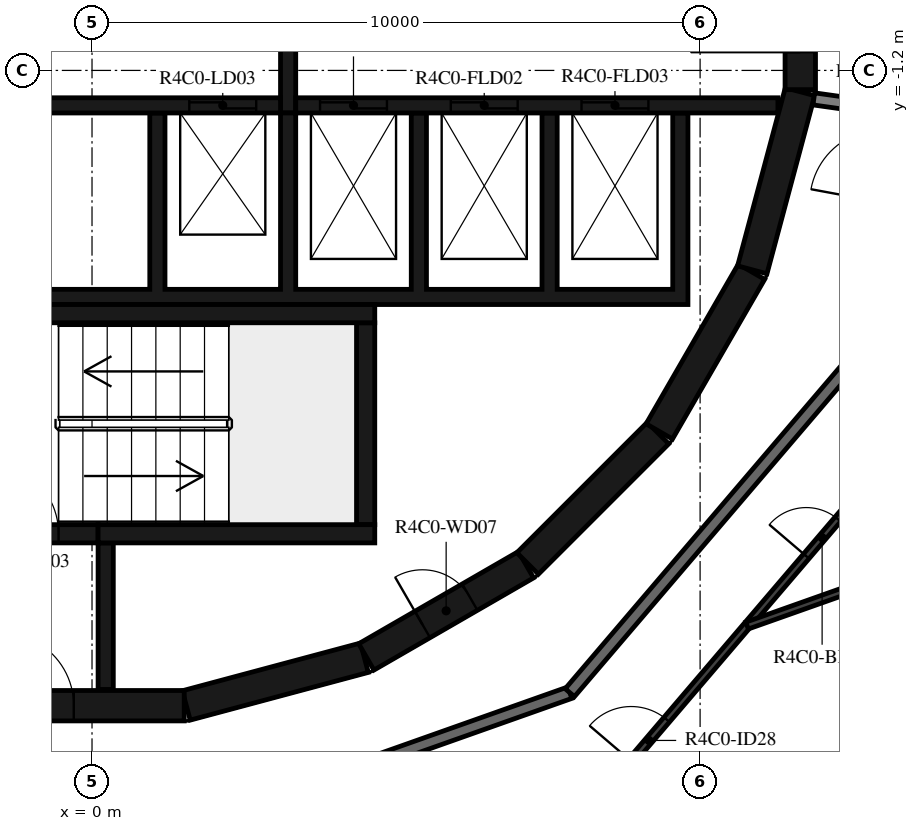
"""IFC4 building model, lengths in metres.
Left out: names, types, materials, properties, quantities, classifications, styles, units other than length and angle.
Written with IfcOpenShell. Run it as: python <this file> out.ifc"""

import sys

from ifc_helpers import new_model, si_unit, direction, frame, frame_2d, origin, place, context, subcontext, project, spatial, polyline, rectangle, outline, extrude, element, fill, save


model = new_model("IFC4")
c1 = context("Model", 3, precision=1e-05, world=origin(), true_north=direction((0.0, 1.0)))
c2 = subcontext(c1, "Body", "Model", "MODEL_VIEW")
j1 = project(units=[si_unit("LENGTHUNIT", "METRE"), si_unit("PLANEANGLEUNIT", "RADIAN")], contexts=[c1])
p1 = place(None, origin())
s1 = spatial("IfcSite", under=j1, at=p1, CompositionType="ELEMENT")
p2 = place(p1, origin())
s2 = spatial("IfcBuilding", under=s1, at=p2, CompositionType="ELEMENT")
p3 = place(p2, frame((0.0, 0.0, 172.7)))
s3 = spatial("IfcBuildingStorey", under=s2, at=p3, CompositionType="ELEMENT", Elevation=172.7)
p4 = place(p3, frame((1.55, -11.643, 0.0), z_axis=(0.0, 0.0, 1.0), x_axis=(0.965948410781, 0.258734743916, 0.0)))
e1 = element("IfcWall", 1, at=p4, inside=s3, PredefinedType="SHEAR", context=c2, shape_type="SweptSolid", body=[
    extrude(rectangle(XDim=3.033, YDim=0.5, at=frame_2d((1.516, 0.0))), origin(), (0.0, 0.0, 1.0), 3.12),
])
p5 = place(p3, frame((4.51, -10.845, 0.0), z_axis=(0.0, 0.0, 1.0), x_axis=(0.865975092491, 0.500087131594, 0.0)))
e2 = element("IfcWall", 2, at=p5, inside=s3, PredefinedType="SHEAR", context=c2, shape_type="SweptSolid", body=[
    extrude(rectangle(XDim=3.033, YDim=0.5, at=frame_2d((1.516, 0.0))), origin(), (0.0, 0.0, 1.0), 3.12),
])
p6 = place(p5, frame((1.066, 0.0, 0.0)))
e3 = element("IfcOpeningElement", 3, at=p6, cuts=e2, PredefinedType="OPENING", context=c2, shape_type="SweptSolid", body=[
    extrude(rectangle(XDim=0.9, YDim=2.1, at=frame_2d((0.45, 1.05))), frame((0.0, 0.26, 0.0), z_axis=(0.0, -1.0, 0.0), x_axis=(1.0, 0.0, 0.0)), (0.0, 0.0, 1.0), 0.52),
])
p7 = place(p3, frame((7.164, -9.308, 0.0), z_axis=(0.0, 0.0, 1.0), x_axis=(0.707106781187, 0.707106781187, 0.0)))
e4 = element("IfcWall", 4, at=p7, inside=s3, PredefinedType="SHEAR", context=c2, shape_type="SweptSolid", body=[
    extrude(rectangle(XDim=3.032, YDim=0.5, at=frame_2d((1.516, 0.0))), origin(), (0.0, 0.0, 1.0), 3.12),
])
for number, where, z_axis, x_axis in (
    (5, (9.329, -7.137, 0.0), (0.0, 0.0, 1.0), (0.5, 0.866, 0.0)),
    (6, (10.858, -4.479, 0.0), (0.0, 0.0, 1.0), (0.259, 0.966, 0.0)),
):
    element("IfcWall", number, at=place(p3, frame(where, z_axis=z_axis, x_axis=x_axis)), inside=s3, PredefinedType="SHEAR", context=c2, shape_type="SweptSolid", body=[
        extrude(rectangle(XDim=3.033, YDim=0.5, at=frame_2d((1.516, 0.0))), origin(), (0.0, 0.0, 1.0), 3.12),
    ])
p8 = place(p3, frame((11.647, -1.516, 0.0), z_axis=(0.0, 0.0, 1.0), x_axis=(0.0, 1.0, 0.0)))
e7 = element("IfcWall", 7, at=p8, inside=s3, PredefinedType="SHEAR", context=c2, shape_type="SweptSolid", body=[
    extrude(rectangle(XDim=3.033, YDim=0.5, at=frame_2d((1.516, 0.0))), origin(), (0.0, 0.0, 1.0), 3.12),
])
p9 = place(p8, frame((0.616, 0.0, 0.0)))
e8 = element("IfcOpeningElement", 8, at=p9, cuts=e7, PredefinedType="OPENING", context=c2, shape_type="SweptSolid", body=[
    extrude(rectangle(XDim=1.8, YDim=2.1, at=frame_2d((0.9, 1.05))), frame((0.0, 0.26, 0.0), z_axis=(0.0, -1.0, 0.0), x_axis=(1.0, 0.0, 0.0)), (0.0, 0.0, 1.0), 0.52),
])
p10 = place(p3, frame((-1.516, -11.647, 0.0), z_axis=(0.0, 0.0, 1.0), x_axis=(1.0, 0.0, 0.0)))
e9 = element("IfcWall", 9, at=p10, inside=s3, PredefinedType="SHEAR", context=c2, shape_type="SweptSolid", body=[
    extrude(rectangle(XDim=3.033, YDim=0.5, at=frame_2d((1.516, 0.0))), origin(), (0.0, 0.0, 1.0), 3.12),
])
p11 = place(p10, frame((0.016, 0.0, 0.0)))
e10 = element("IfcOpeningElement", 10, at=p11, cuts=e9, PredefinedType="OPENING", context=c2, shape_type="SweptSolid", body=[
    extrude(rectangle(XDim=1.2, YDim=2.1, at=frame_2d((0.6, 1.05))), frame((0.0, 0.26, 0.0), z_axis=(0.0, -1.0, 0.0), x_axis=(1.0, 0.0, 0.0)), (0.0, 0.0, 1.0), 0.52),
])
p12 = place(p3, frame((-2.4, -5.2, 0.0), z_axis=(0.0, 0.0, 1.0), x_axis=(1.0, 0.0, 0.0)))
e11 = element("IfcWall", 11, at=p12, inside=s3, PredefinedType="SHEAR", context=c2, shape_type="SweptSolid", body=[
    extrude(rectangle(XDim=7.05, YDim=0.3, at=frame_2d((3.525, 0.0))), origin(), (0.0, 0.0, 1.0), 3.12),
])
p13 = place(p3, frame((4.5, -8.67, 0.0), z_axis=(0.0, 0.0, 1.0), x_axis=(0.0, 1.0, 0.0)))
e12 = element("IfcWall", 12, at=p13, inside=s3, PredefinedType="SHEAR", context=c2, shape_type="SweptSolid", body=[
    extrude(rectangle(XDim=3.32, YDim=0.3, at=frame_2d((1.66, 0.0))), origin(), (0.0, 0.0, 1.0), 3.12),
])
p14 = place(p3, frame((0.1, -8.82, 0.0), z_axis=(0.0, 0.0, 1.0), x_axis=(1.0, 0.0, 0.0)))
e13 = element("IfcWall", 13, at=p14, inside=s3, PredefinedType="SHEAR", context=c2, shape_type="SweptSolid", body=[
    extrude(rectangle(XDim=4.55, YDim=0.3, at=frame_2d((2.275, 0.0))), origin(), (0.0, 0.0, 1.0), 3.12),
])
p15 = place(p3, frame((-2.4, -8.82, 0.0), z_axis=(0.0, 0.0, 1.0), x_axis=(1.0, 0.0, 0.0)))
e14 = element("IfcWall", 14, at=p15, inside=s3, PredefinedType="SHEAR", context=c2, shape_type="SweptSolid", body=[
    extrude(rectangle(XDim=2.5, YDim=0.3, at=frame_2d((1.25, 0.0))), origin(), (0.0, 0.0, 1.0), 3.12),
])
p16 = place(p15, frame((0.65, 0.0, 0.0)))
e15 = element("IfcOpeningElement", 15, at=p16, cuts=e14, PredefinedType="OPENING", context=c2, shape_type="SweptSolid", body=[
    extrude(rectangle(XDim=1.2, YDim=2.1, at=frame_2d((0.6, 1.05))), frame((0.0, 0.16, 0.0), z_axis=(0.0, -1.0, 0.0), x_axis=(1.0, 0.0, 0.0)), (0.0, 0.0, 1.0), 0.32),
])
p17 = place(p3, frame((0.225, -8.97, 0.0), z_axis=(0.0, 0.0, 1.0), x_axis=(0.0, -1.0, 0.0)))
e16 = element("IfcWall", 16, at=p17, inside=s3, PredefinedType="SHEAR", context=c2, shape_type="SweptSolid", body=[
    extrude(rectangle(XDim=2.41, YDim=0.25, at=frame_2d((1.205, 0.0))), origin(), (0.0, 0.0, 1.0), 3.12),
])
p18 = place(p3, origin())
e17 = element("IfcWall", 17, at=p18, inside=s3, PredefinedType="SHEAR", context=c2, shape_type="SweptSolid", body=[
    extrude(outline(polyline([(9.8, -5.05), (9.8, -4.8), (9.8, -1.9), (9.55, -1.9), (9.55, -4.8), (7.65, -4.8), (7.65, -1.9), (7.4, -1.9), (7.4, -4.8), (5.5, -4.8), (5.5, -1.9), (5.25, -1.9), (5.25, -4.8), (3.35, -4.8), (3.35, -1.9), (3.1, -1.9), (3.1, -4.8), (1.2, -4.8), (1.2, -1.9), (0.95, -1.9), (0.95, -4.8), (-5.25, -4.8), (-5.25, -1.9), (-5.5, -1.9), (-5.5, -4.8), (-7.4, -4.8), (-7.4, -1.9), (-7.65, -1.9), (-7.65, -4.8), (-9.55, -4.8), (-9.55, -1.9), (-9.8, -1.9), (-9.8, -4.8), (-9.8, -5.05), (9.8, -5.05)])), origin(), (0.0, 0.0, 1.0), 3.12),
])
p19 = place(p3, frame((-11.28, -1.775, 0.0), z_axis=(0.0, 0.0, 1.0), x_axis=(1.0, 0.0, 0.0)))
e18 = element("IfcWall", 18, at=p19, inside=s3, PredefinedType="SHEAR", context=c2, shape_type="SweptSolid", body=[
    extrude(rectangle(XDim=14.38, YDim=0.25, at=frame_2d((7.19, 0.0))), origin(), (0.0, 0.0, 1.0), 3.12),
])
p20 = place(p19, frame((12.88, 0.0, 0.0)))
e19 = element("IfcOpeningElement", 19, at=p20, cuts=e18, PredefinedType="OPENING", context=c2, shape_type="SweptSolid", body=[
    extrude(rectangle(XDim=1.1, YDim=2.1, at=frame_2d((0.55, 1.05))), frame((0.0, 0.135, 0.0), z_axis=(0.0, -1.0, 0.0), x_axis=(1.0, 0.0, 0.0)), (0.0, 0.0, 1.0), 0.27),
])
p21 = place(p19, frame((8.68, 0.0, 0.0)))
e20 = element("IfcOpeningElement", 20, at=p21, cuts=e18, PredefinedType="OPENING", context=c2, shape_type="SweptSolid", body=[
    extrude(rectangle(XDim=0.9, YDim=2.1, at=frame_2d((0.45, 1.05))), frame((0.0, 0.135, 0.0), z_axis=(0.0, -1.0, 0.0), x_axis=(1.0, 0.0, 0.0)), (0.0, 0.0, 1.0), 0.27),
])
p22 = place(p3, frame((3.35, -1.775, 0.0), z_axis=(0.0, 0.0, 1.0), x_axis=(1.0, 0.0, 0.0)))
e21 = element("IfcWall", 21, at=p22, inside=s3, PredefinedType="SHEAR", context=c2, shape_type="SweptSolid", body=[
    extrude(rectangle(XDim=7.93, YDim=0.25, at=frame_2d((3.965, 0.0))), origin(), (0.0, 0.0, 1.0), 3.12),
])
p23 = place(p22, frame((0.4, 0.0, 0.0)))
e22 = element("IfcOpeningElement", 22, at=p23, cuts=e21, PredefinedType="OPENING", context=c2, shape_type="SweptSolid", body=[
    extrude(rectangle(XDim=1.1, YDim=2.4, at=frame_2d((0.55, 1.2))), frame((0.0, 0.135, 0.0), z_axis=(0.0, -1.0, 0.0), x_axis=(1.0, 0.0, 0.0)), (0.0, 0.0, 1.0), 0.27),
])
p24 = place(p22, frame((2.55, 0.0, 0.0)))
e23 = element("IfcOpeningElement", 23, at=p24, cuts=e21, PredefinedType="OPENING", context=c2, shape_type="SweptSolid", body=[
    extrude(rectangle(XDim=1.1, YDim=2.4, at=frame_2d((0.55, 1.2))), frame((0.0, 0.135, 0.0), z_axis=(0.0, -1.0, 0.0), x_axis=(1.0, 0.0, 0.0)), (0.0, 0.0, 1.0), 0.27),
])
p25 = place(p22, frame((4.7, 0.0, 0.0)))
e24 = element("IfcOpeningElement", 24, at=p25, cuts=e21, PredefinedType="OPENING", context=c2, shape_type="SweptSolid", body=[
    extrude(rectangle(XDim=1.1, YDim=2.4, at=frame_2d((0.55, 1.2))), frame((0.0, 0.135, 0.0), z_axis=(0.0, -1.0, 0.0), x_axis=(1.0, 0.0, 0.0)), (0.0, 0.0, 1.0), 0.27),
])
p26 = place(p3, frame((3.225, -1.9, 0.0), z_axis=(0.0, 0.0, 1.0), x_axis=(0.0, 1.0, 0.0)))
e25 = element("IfcWall", 25, at=p26, inside=s3, PredefinedType="SHEAR", context=c2, shape_type="SweptSolid", body=[
    extrude(rectangle(XDim=3.8, YDim=0.25, at=frame_2d((1.9, 0.0))), origin(), (0.0, 0.0, 1.0), 3.12),
])
p27 = place(p3, frame((13.282, -1.867, 0.0), z_axis=(0.0, 0.0, 1.0), x_axis=(-0.990265430288, 0.139191873241, 0.0)))
e26 = element("IfcWall", 26, at=p27, inside=s3, PredefinedType="STANDARD", context=c2, shape_type="SweptSolid", body=[
    extrude(rectangle(XDim=1.426, YDim=0.2, at=frame_2d((0.713, 0.0))), origin(), (0.0, 0.0, 1.0), 3.12),
])
p28 = place(p3, frame((1.088, -13.83, 0.0), z_axis=(0.0, 0.0, 1.0), x_axis=(0.942648397945, 0.333787354241, 0.0)))
e27 = element("IfcWall", 27, at=p28, inside=s3, PredefinedType="STANDARD", context=c2, shape_type="SweptSolid", body=[
    extrude(rectangle(XDim=7.181, YDim=0.2, at=frame_2d((3.591, 0.0))), origin(), (0.0, 0.0, 1.0), 3.12),
])
p29 = place(p28, frame((0.2, 0.0, 0.0)))
e28 = element("IfcOpeningElement", 28, at=p29, cuts=e27, PredefinedType="OPENING", context=c2, shape_type="SweptSolid", body=[
    extrude(rectangle(XDim=1.0, YDim=2.1, at=frame_2d((0.5, 1.05))), frame((0.0, 0.11, 0.0), z_axis=(0.0, -1.0, 0.0), x_axis=(1.0, 0.0, 0.0)), (0.0, 0.0, 1.0), 0.22),
])
p30 = place(p3, frame((7.858, -11.433, 0.0), z_axis=(0.0, 0.0, 1.0), x_axis=(0.649440801937, 0.760412154545, 0.0)))
e29 = element("IfcWall", 29, at=p30, inside=s3, PredefinedType="STANDARD", context=c2, shape_type="SweptSolid", body=[
    extrude(rectangle(XDim=7.181, YDim=0.2, at=frame_2d((3.59, 0.0))), origin(), (0.0, 0.0, 1.0), 3.12),
])
p31 = place(p3, frame((8.737, -12.713, 0.0), z_axis=(0.0, 0.0, 1.0), x_axis=(0.649427973074, 0.760423111031, 0.0)))
e30 = element("IfcWall", 30, at=p31, inside=s3, PredefinedType="PARTITIONING", context=c2, shape_type="SweptSolid", body=[
    extrude(rectangle(XDim=7.571, YDim=0.12, at=frame_2d((3.785, 0.0))), origin(), (0.0, 0.0, 1.0), 3.12),
])
p32 = place(p31, frame((0.2, 0.0, 0.0)))
e31 = element("IfcOpeningElement", 31, at=p32, cuts=e30, PredefinedType="OPENING", context=c2, shape_type="SweptSolid", body=[
    extrude(rectangle(XDim=0.9, YDim=2.1, at=frame_2d((0.45, 1.05))), frame((0.0, 0.07, 0.0), z_axis=(0.0, -1.0, 0.0), x_axis=(1.0, 0.0, 0.0)), (0.0, 0.0, 1.0), 0.14),
])
p33 = place(p31, frame((4.634, 0.0, 0.0)))
e32 = element("IfcOpeningElement", 32, at=p33, cuts=e30, PredefinedType="OPENING", context=c2, shape_type="SweptSolid", body=[
    extrude(rectangle(XDim=0.8, YDim=2.1, at=frame_2d((0.4, 1.05))), frame((0.0, 0.07, 0.0), z_axis=(0.0, -1.0, 0.0), x_axis=(1.0, 0.0, 0.0)), (0.0, 0.0, 1.0), 0.14),
])
p34 = place(p3, frame((21.362, -6.58, 0.0), z_axis=(0.0, 0.0, 1.0), x_axis=(-0.942647598157, -0.333789612913, 0.0)))
e33 = element("IfcWall", 33, at=p34, inside=s3, PredefinedType="PARTITIONING", context=c2, shape_type="SweptSolid", body=[
    extrude(rectangle(XDim=11.234, YDim=0.12, at=frame_2d((5.617, 0.0))), origin(), (0.0, 0.0, 1.0), 3.12),
])
p35 = place(p16, origin())
e34 = element("IfcDoor", 34, at=p35, inside=s3, OperationType="SINGLE_SWING_LEFT", PredefinedType="DOOR", context=c2, shape_type="SweptSolid", body=[
    extrude(rectangle(XDim=1.2, YDim=2.1, at=frame_2d((0.6, 1.05))), frame((0.0, 0.025, 0.0), z_axis=(0.0, -1.0, 0.0), x_axis=(1.0, 0.0, 0.0)), (0.0, 0.0, 1.0), 0.05),
])
fill(e15, e34)
p36 = place(p11, origin())
e35 = element("IfcDoor", 35, at=p36, inside=s3, OperationType="SINGLE_SWING_RIGHT", PredefinedType="DOOR", context=c2, shape_type="SweptSolid", body=[
    extrude(rectangle(XDim=1.2, YDim=2.1, at=frame_2d((0.6, 1.05))), frame((0.0, 0.025, 0.0), z_axis=(0.0, -1.0, 0.0), x_axis=(1.0, 0.0, 0.0)), (0.0, 0.0, 1.0), 0.05),
])
fill(e10, e35)
p37 = place(p9, origin())
e36 = element("IfcDoor", 36, at=p37, inside=s3, OperationType="DOUBLE_DOOR_SINGLE_SWING", PredefinedType="DOOR", context=c2, shape_type="SweptSolid", body=[
    extrude(rectangle(XDim=1.8, YDim=2.1, at=frame_2d((0.9, 1.05))), frame((0.0, 0.025, 0.0), z_axis=(0.0, -1.0, 0.0), x_axis=(1.0, 0.0, 0.0)), (0.0, 0.0, 1.0), 0.05),
])
fill(e8, e36)
p38 = place(p20, origin())
e37 = element("IfcDoor", 37, at=p38, inside=s3, OperationType="DOUBLE_DOOR_SLIDING", PredefinedType="DOOR", context=c2, shape_type="SweptSolid", body=[
    extrude(rectangle(XDim=1.1, YDim=2.1, at=frame_2d((0.55, 1.05))), frame((0.0, 0.025, 0.0), z_axis=(0.0, -1.0, 0.0), x_axis=(1.0, 0.0, 0.0)), (0.0, 0.0, 1.0), 0.05),
])
fill(e19, e37)
p39 = place(p23, origin())
e38 = element("IfcDoor", 38, at=p39, inside=s3, OperationType="DOUBLE_DOOR_SLIDING", PredefinedType="DOOR", context=c2, shape_type="SweptSolid", body=[
    extrude(rectangle(XDim=1.1, YDim=2.4, at=frame_2d((0.55, 1.2))), frame((0.0, 0.025, 0.0), z_axis=(0.0, -1.0, 0.0), x_axis=(1.0, 0.0, 0.0)), (0.0, 0.0, 1.0), 0.05),
])
fill(e22, e38)
p40 = place(p24, origin())
e39 = element("IfcDoor", 39, at=p40, inside=s3, OperationType="DOUBLE_DOOR_SLIDING", PredefinedType="DOOR", context=c2, shape_type="SweptSolid", body=[
    extrude(rectangle(XDim=1.1, YDim=2.4, at=frame_2d((0.55, 1.2))), frame((0.0, 0.025, 0.0), z_axis=(0.0, -1.0, 0.0), x_axis=(1.0, 0.0, 0.0)), (0.0, 0.0, 1.0), 0.05),
])
fill(e23, e39)
p41 = place(p25, origin())
e40 = element("IfcDoor", 40, at=p41, inside=s3, OperationType="DOUBLE_DOOR_SLIDING", PredefinedType="DOOR", context=c2, shape_type="SweptSolid", body=[
    extrude(rectangle(XDim=1.1, YDim=2.4, at=frame_2d((0.55, 1.2))), frame((0.0, 0.025, 0.0), z_axis=(0.0, -1.0, 0.0), x_axis=(1.0, 0.0, 0.0)), (0.0, 0.0, 1.0), 0.05),
])
fill(e24, e40)
p42 = place(p6, origin())
e41 = element("IfcDoor", 41, at=p42, inside=s3, OperationType="SINGLE_SWING_LEFT", PredefinedType="DOOR", context=c2, shape_type="SweptSolid", body=[
    extrude(rectangle(XDim=0.9, YDim=2.1, at=frame_2d((0.45, 1.05))), frame((0.0, 0.025, 0.0), z_axis=(0.0, -1.0, 0.0), x_axis=(1.0, 0.0, 0.0)), (0.0, 0.0, 1.0), 0.05),
])
fill(e3, e41)
p43 = place(p32, origin())
e42 = element("IfcDoor", 42, at=p43, inside=s3, OperationType="SINGLE_SWING_RIGHT", PredefinedType="DOOR", context=c2, shape_type="SweptSolid", body=[
    extrude(rectangle(XDim=0.9, YDim=2.1, at=frame_2d((0.45, 1.05))), frame((0.0, 0.025, 0.0), z_axis=(0.0, -1.0, 0.0), x_axis=(1.0, 0.0, 0.0)), (0.0, 0.0, 1.0), 0.05),
])
fill(e31, e42)
p44 = place(p33, origin())
e43 = element("IfcDoor", 43, at=p44, inside=s3, OperationType="SINGLE_SWING_RIGHT", PredefinedType="DOOR", context=c2, shape_type="SweptSolid", body=[
    extrude(rectangle(XDim=0.8, YDim=2.1, at=frame_2d((0.4, 1.05))), frame((0.0, 0.025, 0.0), z_axis=(0.0, -1.0, 0.0), x_axis=(1.0, 0.0, 0.0)), (0.0, 0.0, 1.0), 0.05),
])
fill(e32, e43)
save(model, sys.argv[1])
